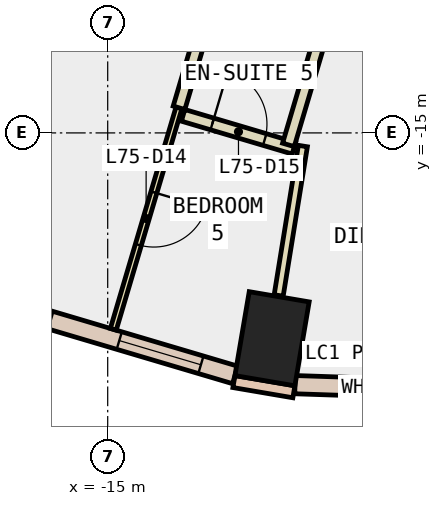
"""IFC4 building model, lengths in metres.
Left out: names, types, materials, properties, quantities, classifications, styles, units other than length and angle.
Written with IfcOpenShell. Run it as: python <this file> out.ifc"""

import sys

from ifc_helpers import new_model, si_unit, direction, frame, frame_2d, origin, origin_2d, place, context, subcontext, project, spatial, rectangle, extrude, element, fill, save


model = new_model("IFC4")
c1 = context("Model", 3, precision=1e-05, world=origin(), true_north=direction((0.0, 1.0)))
c2 = subcontext(c1, "Body", "Model", "MODEL_VIEW")
j1 = project(units=[si_unit("LENGTHUNIT", "METRE"), si_unit("PLANEANGLEUNIT", "RADIAN")], contexts=[c1])
p1 = place(None, origin())
s1 = spatial("IfcSite", under=j1, at=p1, CompositionType="ELEMENT")
p2 = place(p1, origin())
s2 = spatial("IfcBuilding", under=s1, at=p2, CompositionType="ELEMENT")
p3 = place(p2, frame((0.0, 0.0, 318.8)))
s3 = spatial("IfcBuildingStorey", under=s2, at=p3, CompositionType="ELEMENT", Elevation=318.8)
p4 = place(p3, frame((-12.297, -18.385, -0.34), z_axis=(0.0, 0.0, 1.0), x_axis=(-0.985785690827, 0.168007653877, 0.0)))
e1 = element("IfcColumn", 1, at=p4, inside=s3, PredefinedType="COLUMN", context=c2, shape_type="SweptSolid", body=[
    extrude(rectangle(XDim=1.0, YDim=1.4, at=origin_2d()), origin(), (0.0, 0.0, 1.0), 3.6),
])
p5 = place(p3, frame((-12.924, -19.089, 0.0), z_axis=(0.0, 0.0, 1.0), x_axis=(0.985800545746, -0.167920469293, 0.0)))
e2 = element("IfcWall", 2, at=p5, inside=s3, PredefinedType="STANDARD", context=c2, shape_type="SweptSolid", body=[
    extrude(rectangle(XDim=1.0, YDim=0.2, at=frame_2d((0.5, 0.0))), origin(), (0.0, 0.0, 1.0), 3.26),
])
p6 = place(p3, frame((-11.919, -19.14, 0.0), z_axis=(0.0, 0.0, 1.0), x_axis=(0.999441913039, -0.033404527552, 0.0)))
e3 = element("IfcWall", 3, at=p6, inside=s3, PredefinedType="STANDARD", context=c2, shape_type="SweptSolid", body=[
    extrude(rectangle(XDim=3.625, YDim=0.3, at=frame_2d((1.812, 0.0))), origin(), (0.0, 0.0, 1.0), 3.26),
])
p7 = place(p6, frame((1.113, 0.0, 0.9)))
e4 = element("IfcOpeningElement", 4, at=p7, cuts=e3, PredefinedType="OPENING", context=c2, shape_type="SweptSolid", body=[
    extrude(rectangle(XDim=1.4, YDim=2.0, at=frame_2d((0.7, 1.0))), frame((0.0, 0.16, 0.0), z_axis=(0.0, -1.0, 0.0), x_axis=(1.0, 0.0, 0.0)), (0.0, 0.0, 1.0), 0.32),
])
p8 = place(p3, frame((-17.842, -17.516, 0.0), z_axis=(0.0, 0.0, 1.0), x_axis=(0.958757933751, -0.284223898486, 0.0)))
e5 = element("IfcWall", 5, at=p8, inside=s3, PredefinedType="STANDARD", context=c2, shape_type="SweptSolid", body=[
    extrude(rectangle(XDim=5.15, YDim=0.3, at=frame_2d((2.575, 0.0))), origin(), (0.0, 0.0, 1.0), 3.26),
])
p9 = place(p8, frame((0.588, 0.0, 0.9)))
e6 = element("IfcOpeningElement", 6, at=p9, cuts=e5, PredefinedType="OPENING", context=c2, shape_type="SweptSolid", body=[
    extrude(rectangle(XDim=1.4, YDim=2.0, at=frame_2d((0.7, 1.0))), frame((0.0, 0.16, 0.0), z_axis=(0.0, -1.0, 0.0), x_axis=(1.0, 0.0, 0.0)), (0.0, 0.0, 1.0), 0.32),
])
p10 = place(p8, frame((3.163, 0.0, 0.9)))
e7 = element("IfcOpeningElement", 7, at=p10, cuts=e5, PredefinedType="OPENING", context=c2, shape_type="SweptSolid", body=[
    extrude(rectangle(XDim=1.4, YDim=2.0, at=frame_2d((0.7, 1.0))), frame((0.0, 0.16, 0.0), z_axis=(0.0, -1.0, 0.0), x_axis=(1.0, 0.0, 0.0)), (0.0, 0.0, 1.0), 0.32),
])
p11 = place(p3, frame((-13.828, -14.587, 0.0), z_axis=(0.0, 0.0, 1.0), x_axis=(-0.284245833657, -0.958751430794, 0.0)))
e8 = element("IfcWall", 8, at=p11, inside=s3, PredefinedType="PARTITIONING", context=c2, shape_type="SweptSolid", body=[
    extrude(rectangle(XDim=3.8, YDim=0.1, at=frame_2d((1.9, 0.0))), origin(), (0.0, 0.0, 1.0), 3.26),
])
p12 = place(p11, frame((1.45, 0.0, 0.0)))
e9 = element("IfcOpeningElement", 9, at=p12, cuts=e8, PredefinedType="OPENING", context=c2, shape_type="SweptSolid", body=[
    extrude(rectangle(XDim=0.9, YDim=2.1, at=frame_2d((0.45, 1.05))), frame((0.0, 0.06, 0.0), z_axis=(0.0, -1.0, 0.0), x_axis=(1.0, 0.0, 0.0)), (0.0, 0.0, 1.0), 0.12),
])
p13 = place(p3, frame((-13.316, -12.861, 0.0), z_axis=(0.0, 0.0, 1.0), x_axis=(-0.283898972531, -0.958854198195, 0.0)))
e10 = element("IfcWall", 10, at=p13, inside=s3, PredefinedType="PARTITIONING", context=c2, shape_type="SweptSolid", body=[
    extrude(rectangle(XDim=1.8, YDim=0.2, at=frame_2d((0.9, 0.0))), origin(), (0.0, 0.0, 1.0), 3.26),
])
p14 = place(p3, frame((-13.76, -14.711, 0.0), z_axis=(0.0, 0.0, 1.0), x_axis=(0.958772187895, -0.284175811285, 0.0)))
e11 = element("IfcWall", 11, at=p14, inside=s3, PredefinedType="PARTITIONING", context=c2, shape_type="SweptSolid", body=[
    extrude(rectangle(XDim=1.9, YDim=0.2, at=frame_2d((0.95, 0.0))), origin(), (0.0, 0.0, 1.0), 3.26),
])
p15 = place(p14, frame((0.5, 0.0, 0.0)))
e12 = element("IfcOpeningElement", 12, at=p15, cuts=e11, PredefinedType="OPENING", context=c2, shape_type="SweptSolid", body=[
    extrude(rectangle(XDim=0.9, YDim=2.1, at=frame_2d((0.45, 1.05))), frame((0.0, 0.11, 0.0), z_axis=(0.0, -1.0, 0.0), x_axis=(1.0, 0.0, 0.0)), (0.0, 0.0, 1.0), 0.22),
])
p16 = place(p3, frame((-11.79, -15.216, 0.0), z_axis=(0.0, 0.0, 1.0), x_axis=(-0.159880010227, -0.98713645578, 0.0)))
e13 = element("IfcWall", 13, at=p16, inside=s3, PredefinedType="PARTITIONING", context=c2, shape_type="SweptSolid", body=[
    extrude(rectangle(XDim=2.489, YDim=0.15, at=frame_2d((1.245, 0.0))), origin(), (0.0, 0.0, 1.0), 3.26),
])
p17 = place(p3, frame((-11.495, -13.401, 0.0), z_axis=(0.0, 0.0, 1.0), x_axis=(-0.284465432667, -0.958686297815, 0.0)))
e14 = element("IfcWall", 14, at=p17, inside=s3, PredefinedType="PARTITIONING", context=c2, shape_type="SweptSolid", body=[
    extrude(rectangle(XDim=1.874, YDim=0.2, at=frame_2d((0.937, 0.0))), origin(), (0.0, 0.0, 1.0), 3.26),
])
p18 = place(p7, origin())
e15 = element("IfcWindow", 15, at=p18, inside=s3, PartitioningType="SINGLE_PANEL", PredefinedType="WINDOW", context=c2, shape_type="SweptSolid", body=[
    extrude(rectangle(XDim=1.4, YDim=2.0, at=frame_2d((0.7, 1.0))), frame((0.0, 0.03, 0.0), z_axis=(0.0, -1.0, 0.0), x_axis=(1.0, 0.0, 0.0)), (0.0, 0.0, 1.0), 0.06),
])
fill(e4, e15)
p19 = place(p10, origin())
e16 = element("IfcWindow", 16, at=p19, inside=s3, PartitioningType="SINGLE_PANEL", PredefinedType="WINDOW", context=c2, shape_type="SweptSolid", body=[
    extrude(rectangle(XDim=1.4, YDim=2.0, at=frame_2d((0.7, 1.0))), frame((0.0, 0.03, 0.0), z_axis=(0.0, -1.0, 0.0), x_axis=(1.0, 0.0, 0.0)), (0.0, 0.0, 1.0), 0.06),
])
fill(e7, e16)
p20 = place(p12, origin())
e17 = element("IfcDoor", 17, at=p20, inside=s3, OperationType="SINGLE_SWING_RIGHT", PredefinedType="DOOR", context=c2, shape_type="SweptSolid", body=[
    extrude(rectangle(XDim=0.9, YDim=2.1, at=frame_2d((0.45, 1.05))), frame((0.0, 0.025, 0.0), z_axis=(0.0, -1.0, 0.0), x_axis=(1.0, 0.0, 0.0)), (0.0, 0.0, 1.0), 0.05),
])
fill(e9, e17)
p21 = place(p15, origin())
e18 = element("IfcDoor", 18, at=p21, inside=s3, OperationType="SINGLE_SWING_LEFT", PredefinedType="DOOR", context=c2, shape_type="SweptSolid", body=[
    extrude(rectangle(XDim=0.9, YDim=2.1, at=frame_2d((0.45, 1.05))), frame((0.0, 0.025, 0.0), z_axis=(0.0, -1.0, 0.0), x_axis=(1.0, 0.0, 0.0)), (0.0, 0.0, 1.0), 0.05),
])
fill(e12, e18)
save(model, sys.argv[1])
